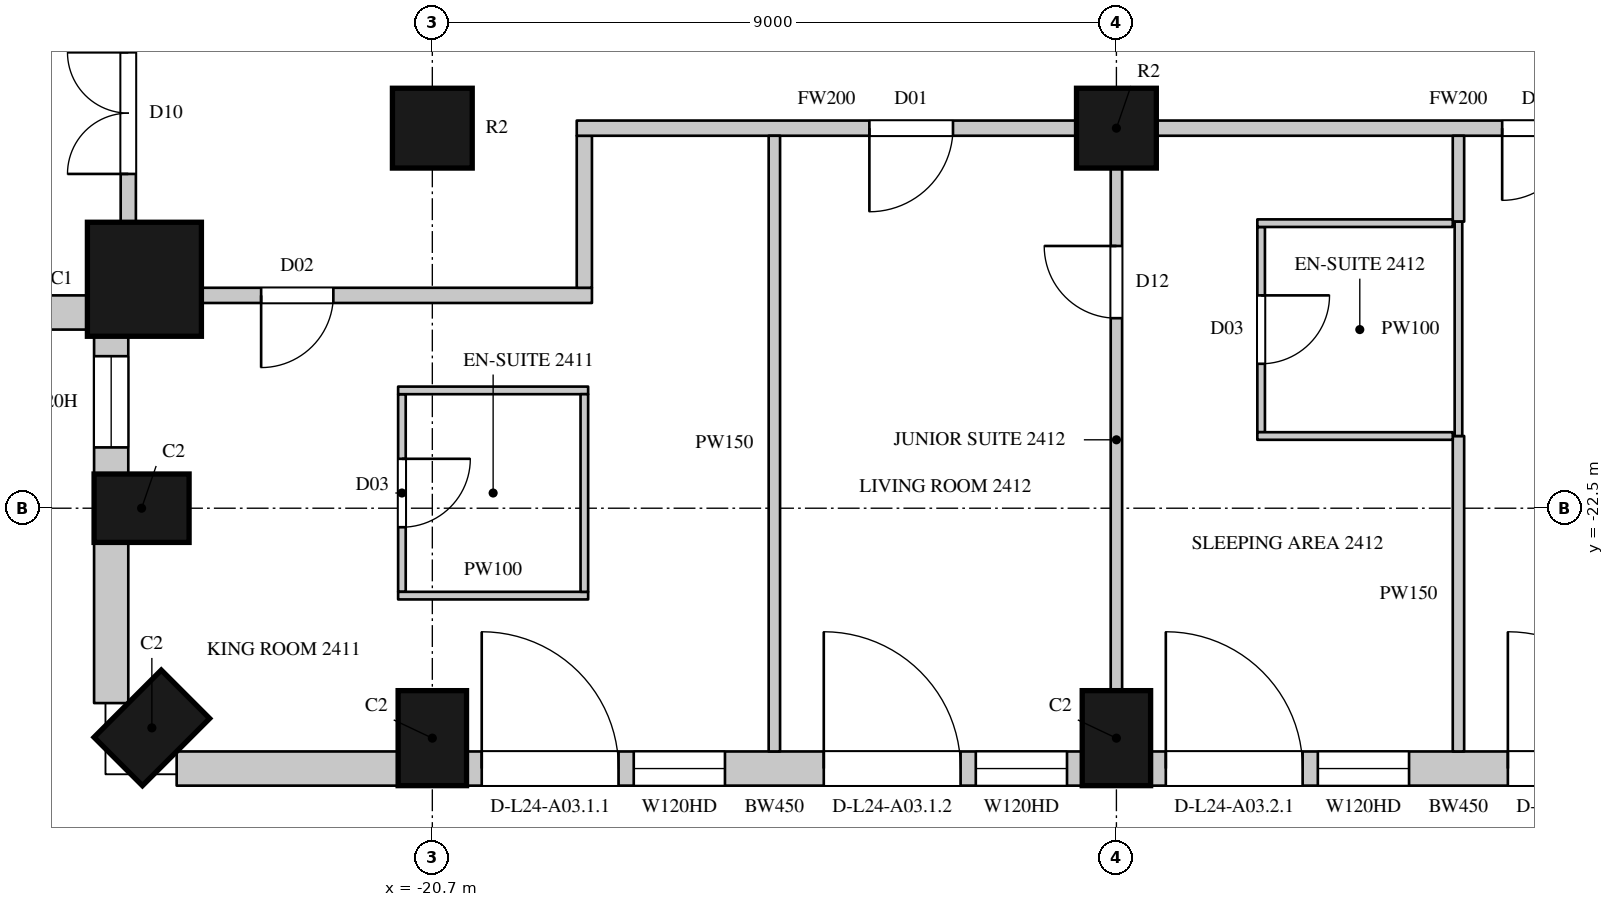
"""IFC4 building model, lengths in metres.
Left out: names, types, materials, properties, quantities, classifications, styles, units other than length and angle.
Written with IfcOpenShell. Run it as: python <this file> out.ifc"""

import sys

from ifc_helpers import new_model, si_unit, direction, frame, frame_2d, origin, origin_2d, place, context, subcontext, project, spatial, rectangle, circle, extrude, element, fill, save


model = new_model("IFC4")
c1 = context("Model", 3, precision=1e-05, world=origin(), true_north=direction((0.0, 1.0)))
c2 = subcontext(c1, "Body", "Model", "MODEL_VIEW")
j1 = project(units=[si_unit("LENGTHUNIT", "METRE"), si_unit("PLANEANGLEUNIT", "RADIAN")], contexts=[c1])
p1 = place(None, origin())
s1 = spatial("IfcSite", under=j1, at=p1, CompositionType="ELEMENT")
p2 = place(p1, origin())
s2 = spatial("IfcBuilding", under=s1, at=p2, CompositionType="ELEMENT")
p3 = place(p2, frame((0.0, 0.0, 116.7)))
s3 = spatial("IfcBuildingStorey", under=s2, at=p3, CompositionType="ELEMENT", Elevation=116.7)
p4 = place(p3, frame((-24.488, -19.488, 0.0), z_axis=(0.0, 0.0, 1.0), x_axis=(1.0, 0.0, 0.0)))
e1 = element("IfcColumn", 1, at=p4, inside=s3, PredefinedType="COLUMN", context=c2, shape_type="SweptSolid", body=[
    extrude(circle(Radius=0.75, at=origin_2d()), origin(), (0.0, 0.0, 1.0), 3.6),
])
for number, where, z_axis, x_axis in (
    (2, (-24.525, -22.5, 0.0), (0.0, 0.0, 1.0), (0.0, -1.0, 0.0)),
    (3, (-24.39, -25.39, 0.0), (0.0, 0.0, 1.0), (0.707, -0.707, 0.0)),
    (4, (-20.7, -25.525, 0.0), (0.0, 0.0, 1.0), (1.0, 0.0, 0.0)),
    (5, (-11.7, -25.525, 0.0), (0.0, 0.0, 1.0), (1.0, 0.0, 0.0)),
):
    element("IfcColumn", number, at=place(p3, frame(where, z_axis=z_axis, x_axis=x_axis)), inside=s3, PredefinedType="COLUMN", context=c2, shape_type="SweptSolid", body=[
        extrude(rectangle(XDim=0.9, YDim=1.25, at=origin_2d()), origin(), (0.0, 0.0, 1.0), 3.6),
    ])
for number, where, z_axis, x_axis in (
    (6, (-20.7, -17.5, 0.0), (0.0, 0.0, 1.0), (1.0, 0.0, 0.0)),
    (7, (-11.7, -17.5, 0.0), (0.0, 0.0, 1.0), (1.0, 0.0, 0.0)),
):
    element("IfcColumn", number, at=place(p3, frame(where, z_axis=z_axis, x_axis=x_axis)), inside=s3, PredefinedType="COLUMN", context=c2, shape_type="SweptSolid", body=[
        extrude(circle(Radius=0.525, at=origin_2d()), origin(), (0.0, 0.0, 1.0), 3.6),
    ])
p5 = place(p3, frame((-29.064, -19.925, 0.0), z_axis=(0.0, 0.0, 1.0), x_axis=(1.0, 0.0, 0.0)))
e8 = element("IfcWall", 8, at=p5, inside=s3, PredefinedType="SOLIDWALL", context=c2, shape_type="SweptSolid", body=[
    extrude(rectangle(XDim=3.857, YDim=0.45, at=frame_2d((1.928, 0.0))), origin(), (0.0, 0.0, 1.0), 3.3),
])
p6 = place(p5, frame((0.514, 0.0, 1.05)))
e9 = element("IfcOpeningElement", 9, at=p6, cuts=e8, PredefinedType="OPENING", context=c2, shape_type="SweptSolid", body=[
    extrude(rectangle(XDim=2.7, YDim=2.0, at=frame_2d((1.35, 1.0))), frame((0.0, 0.235, 0.0), z_axis=(0.0, -1.0, 0.0), x_axis=(1.0, 0.0, 0.0)), (0.0, 0.0, 1.0), 0.47),
])
p7 = place(p3, frame((-24.925, -20.207, 0.0), z_axis=(0.0, 0.0, 1.0), x_axis=(0.0, -1.0, 0.0)))
e10 = element("IfcWall", 10, at=p7, inside=s3, PredefinedType="SOLIDWALL", context=c2, shape_type="SweptSolid", body=[
    extrude(rectangle(XDim=1.843, YDim=0.45, at=frame_2d((0.921, 0.0))), origin(), (0.0, 0.0, 1.0), 3.3),
])
p8 = place(p7, frame((0.293, 0.0, 1.05)))
e11 = element("IfcOpeningElement", 11, at=p8, cuts=e10, PredefinedType="OPENING", context=c2, shape_type="SweptSolid", body=[
    extrude(rectangle(XDim=1.2, YDim=2.0, at=frame_2d((0.6, 1.0))), frame((0.0, 0.235, 0.0), z_axis=(0.0, -1.0, 0.0), x_axis=(1.0, 0.0, 0.0)), (0.0, 0.0, 1.0), 0.47),
])
p9 = place(p3, frame((-24.925, -22.95, 0.0), z_axis=(0.0, 0.0, 1.0), x_axis=(0.0, -1.0, 0.0)))
e12 = element("IfcWall", 12, at=p9, inside=s3, PredefinedType="SOLIDWALL", context=c2, shape_type="SweptSolid", body=[
    extrude(rectangle(XDim=2.114, YDim=0.45, at=frame_2d((1.057, 0.0))), origin(), (0.0, 0.0, 1.0), 3.3),
])
p10 = place(p3, frame((-24.064, -25.925, 0.0), z_axis=(0.0, 0.0, 1.0), x_axis=(1.0, 0.0, 0.0)))
e13 = element("IfcWall", 13, at=p10, inside=s3, PredefinedType="SOLIDWALL", context=c2, shape_type="SweptSolid", body=[
    extrude(rectangle(XDim=2.914, YDim=0.45, at=frame_2d((1.457, 0.0))), origin(), (0.0, 0.0, 1.0), 3.3),
])
p11 = place(p3, frame((-20.25, -25.925, 0.0), z_axis=(0.0, 0.0, 1.0), x_axis=(1.0, 0.0, 0.0)))
e14 = element("IfcWall", 14, at=p11, inside=s3, PredefinedType="SOLIDWALL", context=c2, shape_type="SweptSolid", body=[
    extrude(rectangle(XDim=8.1, YDim=0.45, at=frame_2d((4.05, 0.0))), origin(), (0.0, 0.0, 1.0), 3.3),
])
p12 = place(p11, frame((0.2, 0.0, 0.0)))
e15 = element("IfcOpeningElement", 15, at=p12, cuts=e14, PredefinedType="OPENING", context=c2, shape_type="SweptSolid", body=[
    extrude(rectangle(XDim=1.8, YDim=2.4, at=frame_2d((0.9, 1.2))), frame((0.0, 0.235, 0.0), z_axis=(0.0, -1.0, 0.0), x_axis=(1.0, 0.0, 0.0)), (0.0, 0.0, 1.0), 0.47),
])
p13 = place(p11, frame((2.2, 0.0, 1.05)))
e16 = element("IfcOpeningElement", 16, at=p13, cuts=e14, PredefinedType="OPENING", context=c2, shape_type="SweptSolid", body=[
    extrude(rectangle(XDim=1.2, YDim=2.0, at=frame_2d((0.6, 1.0))), frame((0.0, 0.235, 0.0), z_axis=(0.0, -1.0, 0.0), x_axis=(1.0, 0.0, 0.0)), (0.0, 0.0, 1.0), 0.47),
])
p14 = place(p11, frame((4.7, 0.0, 0.0)))
e17 = element("IfcOpeningElement", 17, at=p14, cuts=e14, PredefinedType="OPENING", context=c2, shape_type="SweptSolid", body=[
    extrude(rectangle(XDim=1.8, YDim=2.4, at=frame_2d((0.9, 1.2))), frame((0.0, 0.235, 0.0), z_axis=(0.0, -1.0, 0.0), x_axis=(1.0, 0.0, 0.0)), (0.0, 0.0, 1.0), 0.47),
])
p15 = place(p11, frame((6.7, 0.0, 1.05)))
e18 = element("IfcOpeningElement", 18, at=p15, cuts=e14, PredefinedType="OPENING", context=c2, shape_type="SweptSolid", body=[
    extrude(rectangle(XDim=1.2, YDim=2.0, at=frame_2d((0.6, 1.0))), frame((0.0, 0.235, 0.0), z_axis=(0.0, -1.0, 0.0), x_axis=(1.0, 0.0, 0.0)), (0.0, 0.0, 1.0), 0.47),
])
p16 = place(p3, frame((-11.25, -25.925, 0.0), z_axis=(0.0, 0.0, 1.0), x_axis=(1.0, 0.0, 0.0)))
e19 = element("IfcWall", 19, at=p16, inside=s3, PredefinedType="SOLIDWALL", context=c2, shape_type="SweptSolid", body=[
    extrude(rectangle(XDim=8.1, YDim=0.45, at=frame_2d((4.05, 0.0))), origin(), (0.0, 0.0, 1.0), 3.3),
])
p17 = place(p16, frame((0.2, 0.0, 0.0)))
e20 = element("IfcOpeningElement", 20, at=p17, cuts=e19, PredefinedType="OPENING", context=c2, shape_type="SweptSolid", body=[
    extrude(rectangle(XDim=1.8, YDim=2.4, at=frame_2d((0.9, 1.2))), frame((0.0, 0.235, 0.0), z_axis=(0.0, -1.0, 0.0), x_axis=(1.0, 0.0, 0.0)), (0.0, 0.0, 1.0), 0.47),
])
p18 = place(p16, frame((2.2, 0.0, 1.05)))
e21 = element("IfcOpeningElement", 21, at=p18, cuts=e19, PredefinedType="OPENING", context=c2, shape_type="SweptSolid", body=[
    extrude(rectangle(XDim=1.2, YDim=2.0, at=frame_2d((0.6, 1.0))), frame((0.0, 0.235, 0.0), z_axis=(0.0, -1.0, 0.0), x_axis=(1.0, 0.0, 0.0)), (0.0, 0.0, 1.0), 0.47),
])
p19 = place(p16, frame((4.7, 0.0, 0.0)))
e22 = element("IfcOpeningElement", 22, at=p19, cuts=e19, PredefinedType="OPENING", context=c2, shape_type="SweptSolid", body=[
    extrude(rectangle(XDim=1.8, YDim=2.4, at=frame_2d((0.9, 1.2))), frame((0.0, 0.235, 0.0), z_axis=(0.0, -1.0, 0.0), x_axis=(1.0, 0.0, 0.0)), (0.0, 0.0, 1.0), 0.47),
])
p20 = place(p16, frame((6.7, 0.0, 1.05)))
e23 = element("IfcOpeningElement", 23, at=p20, cuts=e19, PredefinedType="OPENING", context=c2, shape_type="SweptSolid", body=[
    extrude(rectangle(XDim=1.2, YDim=2.0, at=frame_2d((0.6, 1.0))), frame((0.0, 0.235, 0.0), z_axis=(0.0, -1.0, 0.0), x_axis=(1.0, 0.0, 0.0)), (0.0, 0.0, 1.0), 0.47),
])
p21 = place(p3, frame((-24.7, -18.752, 0.0), z_axis=(0.0, 0.0, 1.0), x_axis=(0.0, 1.0, 0.0)))
e24 = element("IfcWall", 24, at=p21, inside=s3, PredefinedType="PARTITIONING", context=c2, shape_type="SweptSolid", body=[
    extrude(rectangle(XDim=2.722, YDim=0.2, at=frame_2d((1.361, 0.0))), origin(), (0.0, 0.0, 1.0), 3.3),
])
p22 = place(p21, frame((0.65, 0.0, 0.0)))
e25 = element("IfcOpeningElement", 25, at=p22, cuts=e24, PredefinedType="OPENING", context=c2, shape_type="SweptSolid", body=[
    extrude(rectangle(XDim=1.6, YDim=2.4, at=frame_2d((0.8, 1.2))), frame((0.0, 0.11, 0.0), z_axis=(0.0, -1.0, 0.0), x_axis=(1.0, 0.0, 0.0)), (0.0, 0.0, 1.0), 0.22),
])
p23 = place(p3, frame((-23.752, -19.7, 0.0), z_axis=(0.0, 0.0, 1.0), x_axis=(1.0, 0.0, 0.0)))
e26 = element("IfcWall", 26, at=p23, inside=s3, PredefinedType="PARTITIONING", context=c2, shape_type="SweptSolid", body=[
    extrude(rectangle(XDim=5.152, YDim=0.2, at=frame_2d((2.576, 0.0))), origin(), (0.0, 0.0, 1.0), 3.3),
])
p24 = place(p23, frame((0.8, 0.0, 0.0)))
e27 = element("IfcOpeningElement", 27, at=p24, cuts=e26, PredefinedType="OPENING", context=c2, shape_type="SweptSolid", body=[
    extrude(rectangle(XDim=0.95, YDim=2.2, at=frame_2d((0.475, 1.1))), frame((0.0, 0.11, 0.0), z_axis=(0.0, -1.0, 0.0), x_axis=(1.0, 0.0, 0.0)), (0.0, 0.0, 1.0), 0.22),
])
p25 = place(p3, frame((-18.7, -19.6, 0.0), z_axis=(0.0, 0.0, 1.0), x_axis=(0.0, 1.0, 0.0)))
e28 = element("IfcWall", 28, at=p25, inside=s3, PredefinedType="PARTITIONING", context=c2, shape_type="SweptSolid", body=[
    extrude(rectangle(XDim=2.0, YDim=0.2, at=frame_2d((1.0, 0.0))), origin(), (0.0, 0.0, 1.0), 3.3),
])
p26 = place(p3, frame((-18.8, -17.5, 0.0), z_axis=(0.0, 0.0, 1.0), x_axis=(1.0, 0.0, 0.0)))
e29 = element("IfcWall", 29, at=p26, inside=s3, PredefinedType="PARTITIONING", context=c2, shape_type="SweptSolid", body=[
    extrude(rectangle(XDim=6.575, YDim=0.2, at=frame_2d((3.288, 0.0))), origin(), (0.0, 0.0, 1.0), 2.75),
])
p27 = place(p26, frame((3.85, 0.0, 0.0)))
e30 = element("IfcOpeningElement", 30, at=p27, cuts=e29, PredefinedType="OPENING", context=c2, shape_type="SweptSolid", body=[
    extrude(rectangle(XDim=1.1, YDim=2.4, at=frame_2d((0.55, 1.2))), frame((0.0, 0.11, 0.0), z_axis=(0.0, -1.0, 0.0), x_axis=(1.0, 0.0, 0.0)), (0.0, 0.0, 1.0), 0.22),
])
p28 = place(p3, frame((-11.175, -17.5, 0.0), z_axis=(0.0, 0.0, 1.0), x_axis=(1.0, 0.0, 0.0)))
e31 = element("IfcWall", 31, at=p28, inside=s3, PredefinedType="PARTITIONING", context=c2, shape_type="SweptSolid", body=[
    extrude(rectangle(XDim=7.95, YDim=0.2, at=frame_2d((3.975, 0.0))), origin(), (0.0, 0.0, 1.0), 2.75),
])
p29 = place(p28, frame((4.55, 0.0, 0.0)))
e32 = element("IfcOpeningElement", 32, at=p29, cuts=e31, PredefinedType="OPENING", context=c2, shape_type="SweptSolid", body=[
    extrude(rectangle(XDim=0.95, YDim=2.2, at=frame_2d((0.475, 1.1))), frame((0.0, 0.11, 0.0), z_axis=(0.0, -1.0, 0.0), x_axis=(1.0, 0.0, 0.0)), (0.0, 0.0, 1.0), 0.22),
])
p30 = place(p3, frame((-16.2, -25.7, 0.0), z_axis=(0.0, 0.0, 1.0), x_axis=(0.0, 1.0, 0.0)))
e33 = element("IfcWall", 33, at=p30, inside=s3, PredefinedType="PARTITIONING", context=c2, shape_type="SweptSolid", body=[
    extrude(rectangle(XDim=8.1, YDim=0.15, at=frame_2d((4.05, 0.0))), origin(), (0.0, 0.0, 1.0), 2.65),
])
p31 = place(p3, frame((-11.7, -24.9, 0.0), z_axis=(0.0, 0.0, 1.0), x_axis=(0.0, 1.0, 0.0)))
e34 = element("IfcWall", 34, at=p31, inside=s3, PredefinedType="PARTITIONING", context=c2, shape_type="SweptSolid", body=[
    extrude(rectangle(XDim=6.875, YDim=0.15, at=frame_2d((3.438, 0.0))), origin(), (0.0, 0.0, 1.0), 2.75),
])
p32 = place(p31, frame((4.9, 0.0, 0.0)))
e35 = element("IfcOpeningElement", 35, at=p32, cuts=e34, PredefinedType="OPENING", context=c2, shape_type="SweptSolid", body=[
    extrude(rectangle(XDim=0.95, YDim=2.2, at=frame_2d((0.475, 1.1))), frame((0.0, 0.085, 0.0), z_axis=(0.0, -1.0, 0.0), x_axis=(1.0, 0.0, 0.0)), (0.0, 0.0, 1.0), 0.17),
])
p33 = place(p3, frame((-7.2, -25.7, 0.0), z_axis=(0.0, 0.0, 1.0), x_axis=(0.0, 1.0, 0.0)))
e36 = element("IfcWall", 36, at=p33, inside=s3, PredefinedType="PARTITIONING", context=c2, shape_type="SweptSolid", body=[
    extrude(rectangle(XDim=4.15, YDim=0.15, at=frame_2d((2.075, 0.0))), origin(), (0.0, 0.0, 1.0), 2.65),
])
p34 = place(p3, frame((-7.2, -18.73, 0.0), z_axis=(0.0, 0.0, 1.0), x_axis=(0.0, 1.0, 0.0)))
e37 = element("IfcWall", 37, at=p34, inside=s3, PredefinedType="PARTITIONING", context=c2, shape_type="SweptSolid", body=[
    extrude(rectangle(XDim=1.13, YDim=0.15, at=frame_2d((0.565, 0.0))), origin(), (0.0, 0.0, 1.0), 2.65),
])
p35 = place(p3, frame((-21.1, -23.6, 0.0), z_axis=(0.0, 0.0, 1.0), x_axis=(0.0, 1.0, 0.0)))
e38 = element("IfcWall", 38, at=p35, inside=s3, PredefinedType="PARTITIONING", context=c2, shape_type="SweptSolid", body=[
    extrude(rectangle(XDim=2.6, YDim=0.1, at=frame_2d((1.3, 0.0))), origin(), (0.0, 0.0, 1.0), 3.3),
])
p36 = place(p35, frame((0.85, 0.0, 0.0)))
e39 = element("IfcOpeningElement", 39, at=p36, cuts=e38, PredefinedType="OPENING", context=c2, shape_type="SweptSolid", body=[
    extrude(rectangle(XDim=0.9, YDim=2.2, at=frame_2d((0.45, 1.1))), frame((0.0, 0.06, 0.0), z_axis=(0.0, -1.0, 0.0), x_axis=(1.0, 0.0, 0.0)), (0.0, 0.0, 1.0), 0.12),
])
for number, where, z_axis, x_axis in (
    (40, (-21.15, -23.65, 0.0), (0.0, 0.0, 1.0), (1.0, 0.0, 0.0)),
    (41, (-21.15, -20.95, 0.0), (0.0, 0.0, 1.0), (1.0, 0.0, 0.0)),
):
    element("IfcWall", number, at=place(p3, frame(where, z_axis=z_axis, x_axis=x_axis)), inside=s3, PredefinedType="PARTITIONING", context=c2, shape_type="SweptSolid", body=[
        extrude(rectangle(XDim=2.5, YDim=0.1, at=frame_2d((1.25, 0.0))), origin(), (0.0, 0.0, 1.0), 3.3),
    ])
p37 = place(p3, frame((-18.7, -23.6, 0.0), z_axis=(0.0, 0.0, 1.0), x_axis=(0.0, 1.0, 0.0)))
e42 = element("IfcWall", 42, at=p37, inside=s3, PredefinedType="PARTITIONING", context=c2, shape_type="SweptSolid", body=[
    extrude(rectangle(XDim=2.6, YDim=0.1, at=frame_2d((1.3, 0.0))), origin(), (0.0, 0.0, 1.0), 3.3),
])
p38 = place(p3, frame((-9.796, -21.5, 0.0), z_axis=(0.0, 0.0, 1.0), x_axis=(0.0, 1.0, 0.0)))
e43 = element("IfcWall", 43, at=p38, inside=s3, PredefinedType="PARTITIONING", context=c2, shape_type="SweptSolid", body=[
    extrude(rectangle(XDim=2.7, YDim=0.1, at=frame_2d((1.35, 0.0))), origin(), (0.0, 0.0, 1.0), 3.3),
])
p39 = place(p38, frame((0.9, 0.0, 0.0)))
e44 = element("IfcOpeningElement", 44, at=p39, cuts=e43, PredefinedType="OPENING", context=c2, shape_type="SweptSolid", body=[
    extrude(rectangle(XDim=0.9, YDim=2.2, at=frame_2d((0.45, 1.1))), frame((0.0, 0.06, 0.0), z_axis=(0.0, -1.0, 0.0), x_axis=(1.0, 0.0, 0.0)), (0.0, 0.0, 1.0), 0.12),
])
for number, where, z_axis, x_axis in (
    (45, (-9.846, -21.55, 0.0), (0.0, 0.0, 1.0), (1.0, 0.0, 0.0)),
    (46, (-9.846, -18.75, 0.0), (0.0, 0.0, 1.0), (1.0, 0.0, 0.0)),
):
    element("IfcWall", number, at=place(p3, frame(where, z_axis=z_axis, x_axis=x_axis)), inside=s3, PredefinedType="PARTITIONING", context=c2, shape_type="SweptSolid", body=[
        extrude(rectangle(XDim=2.571, YDim=0.1, at=frame_2d((1.286, 0.0))), origin(), (0.0, 0.0, 1.0), 3.3),
    ])
p40 = place(p3, frame((-7.2, -21.55, 0.0), z_axis=(0.0, 0.0, 1.0), x_axis=(0.0, 1.0, 0.0)))
e47 = element("IfcWall", 47, at=p40, inside=s3, PredefinedType="PARTITIONING", context=c2, shape_type="SweptSolid", body=[
    extrude(rectangle(XDim=2.82, YDim=0.1, at=frame_2d((1.41, 0.0))), origin(), (0.0, 0.0, 1.0), 2.65),
])
p41 = place(p8, origin())
e48 = element("IfcWindow", 48, at=p41, inside=s3, PartitioningType="SINGLE_PANEL", PredefinedType="WINDOW", context=c2, shape_type="SweptSolid", body=[
    extrude(rectangle(XDim=1.2, YDim=2.0, at=frame_2d((0.6, 1.0))), frame((0.0, 0.135, 0.0), z_axis=(0.0, -1.0, 0.0), x_axis=(1.0, 0.0, 0.0)), (0.0, 0.0, 1.0), 0.06),
])
fill(e11, e48)
p42 = place(p12, origin())
e49 = element("IfcDoor", 49, at=p42, inside=s3, OperationType="SLIDING_TO_LEFT", PredefinedType="DOOR", context=c2, shape_type="SweptSolid", body=[
    extrude(rectangle(XDim=1.8, YDim=2.4, at=frame_2d((0.9, 1.2))), frame((0.0, 0.13, 0.0), z_axis=(0.0, -1.0, 0.0), x_axis=(1.0, 0.0, 0.0)), (0.0, 0.0, 1.0), 0.05),
])
fill(e15, e49)
p43 = place(p13, origin())
e50 = element("IfcWindow", 50, at=p43, inside=s3, PartitioningType="SINGLE_PANEL", PredefinedType="WINDOW", context=c2, shape_type="SweptSolid", body=[
    extrude(rectangle(XDim=1.2, YDim=2.0, at=frame_2d((0.6, 1.0))), frame((0.0, 0.135, 0.0), z_axis=(0.0, -1.0, 0.0), x_axis=(1.0, 0.0, 0.0)), (0.0, 0.0, 1.0), 0.06),
])
fill(e16, e50)
p44 = place(p14, origin())
e51 = element("IfcDoor", 51, at=p44, inside=s3, OperationType="SLIDING_TO_LEFT", PredefinedType="DOOR", context=c2, shape_type="SweptSolid", body=[
    extrude(rectangle(XDim=1.8, YDim=2.4, at=frame_2d((0.9, 1.2))), frame((0.0, 0.13, 0.0), z_axis=(0.0, -1.0, 0.0), x_axis=(1.0, 0.0, 0.0)), (0.0, 0.0, 1.0), 0.05),
])
fill(e17, e51)
p45 = place(p15, origin())
e52 = element("IfcWindow", 52, at=p45, inside=s3, PartitioningType="SINGLE_PANEL", PredefinedType="WINDOW", context=c2, shape_type="SweptSolid", body=[
    extrude(rectangle(XDim=1.2, YDim=2.0, at=frame_2d((0.6, 1.0))), frame((0.0, 0.135, 0.0), z_axis=(0.0, -1.0, 0.0), x_axis=(1.0, 0.0, 0.0)), (0.0, 0.0, 1.0), 0.06),
])
fill(e18, e52)
p46 = place(p17, origin())
e53 = element("IfcDoor", 53, at=p46, inside=s3, OperationType="SLIDING_TO_LEFT", PredefinedType="DOOR", context=c2, shape_type="SweptSolid", body=[
    extrude(rectangle(XDim=1.8, YDim=2.4, at=frame_2d((0.9, 1.2))), frame((0.0, 0.13, 0.0), z_axis=(0.0, -1.0, 0.0), x_axis=(1.0, 0.0, 0.0)), (0.0, 0.0, 1.0), 0.05),
])
fill(e20, e53)
p47 = place(p18, origin())
e54 = element("IfcWindow", 54, at=p47, inside=s3, PartitioningType="SINGLE_PANEL", PredefinedType="WINDOW", context=c2, shape_type="SweptSolid", body=[
    extrude(rectangle(XDim=1.2, YDim=2.0, at=frame_2d((0.6, 1.0))), frame((0.0, 0.135, 0.0), z_axis=(0.0, -1.0, 0.0), x_axis=(1.0, 0.0, 0.0)), (0.0, 0.0, 1.0), 0.06),
])
fill(e21, e54)
p48 = place(p19, origin())
e55 = element("IfcDoor", 55, at=p48, inside=s3, OperationType="SLIDING_TO_LEFT", PredefinedType="DOOR", context=c2, shape_type="SweptSolid", body=[
    extrude(rectangle(XDim=1.8, YDim=2.4, at=frame_2d((0.9, 1.2))), frame((0.0, 0.13, 0.0), z_axis=(0.0, -1.0, 0.0), x_axis=(1.0, 0.0, 0.0)), (0.0, 0.0, 1.0), 0.05),
])
fill(e22, e55)
p49 = place(p22, origin())
e56 = element("IfcDoor", 56, at=p49, inside=s3, OperationType="DOUBLE_DOOR_SINGLE_SWING", PredefinedType="DOOR", context=c2, shape_type="SweptSolid", body=[
    extrude(rectangle(XDim=1.6, YDim=2.4, at=frame_2d((0.8, 1.2))), frame((0.0, 0.025, 0.0), z_axis=(0.0, -1.0, 0.0), x_axis=(1.0, 0.0, 0.0)), (0.0, 0.0, 1.0), 0.05),
])
fill(e25, e56)
p50 = place(p24, origin())
e57 = element("IfcDoor", 57, at=p50, inside=s3, OperationType="SINGLE_SWING_RIGHT", PredefinedType="DOOR", context=c2, shape_type="SweptSolid", body=[
    extrude(rectangle(XDim=0.95, YDim=2.2, at=frame_2d((0.475, 1.1))), frame((0.0, 0.025, 0.0), z_axis=(0.0, -1.0, 0.0), x_axis=(1.0, 0.0, 0.0)), (0.0, 0.0, 1.0), 0.05),
])
fill(e27, e57)
p51 = place(p36, origin())
e58 = element("IfcDoor", 58, at=p51, inside=s3, OperationType="SINGLE_SWING_LEFT", PredefinedType="DOOR", context=c2, shape_type="SweptSolid", body=[
    extrude(rectangle(XDim=0.9, YDim=2.2, at=frame_2d((0.45, 1.1))), frame((0.0, 0.025, 0.0), z_axis=(0.0, -1.0, 0.0), x_axis=(1.0, 0.0, 0.0)), (0.0, 0.0, 1.0), 0.05),
])
fill(e39, e58)
p52 = place(p27, origin())
e59 = element("IfcDoor", 59, at=p52, inside=s3, OperationType="SINGLE_SWING_RIGHT", PredefinedType="DOOR", context=c2, shape_type="SweptSolid", body=[
    extrude(rectangle(XDim=1.1, YDim=2.4, at=frame_2d((0.55, 1.2))), frame((0.0, 0.025, 0.0), z_axis=(0.0, -1.0, 0.0), x_axis=(1.0, 0.0, 0.0)), (0.0, 0.0, 1.0), 0.05),
])
fill(e30, e59)
p53 = place(p32, origin())
e60 = element("IfcDoor", 60, at=p53, inside=s3, OperationType="SINGLE_SWING_RIGHT", PredefinedType="DOOR", context=c2, shape_type="SweptSolid", body=[
    extrude(rectangle(XDim=0.95, YDim=2.2, at=frame_2d((0.475, 1.1))), frame((0.0, 0.025, 0.0), z_axis=(0.0, -1.0, 0.0), x_axis=(1.0, 0.0, 0.0)), (0.0, 0.0, 1.0), 0.05),
])
fill(e35, e60)
p54 = place(p39, origin())
e61 = element("IfcDoor", 61, at=p54, inside=s3, OperationType="SINGLE_SWING_LEFT", PredefinedType="DOOR", context=c2, shape_type="SweptSolid", body=[
    extrude(rectangle(XDim=0.9, YDim=2.2, at=frame_2d((0.45, 1.1))), frame((0.0, 0.025, 0.0), z_axis=(0.0, -1.0, 0.0), x_axis=(1.0, 0.0, 0.0)), (0.0, 0.0, 1.0), 0.05),
])
fill(e44, e61)
p55 = place(p29, origin())
e62 = element("IfcDoor", 62, at=p55, inside=s3, OperationType="SINGLE_SWING_RIGHT", PredefinedType="DOOR", context=c2, shape_type="SweptSolid", body=[
    extrude(rectangle(XDim=0.95, YDim=2.2, at=frame_2d((0.475, 1.1))), frame((0.0, 0.025, 0.0), z_axis=(0.0, -1.0, 0.0), x_axis=(1.0, 0.0, 0.0)), (0.0, 0.0, 1.0), 0.05),
])
fill(e32, e62)
save(model, sys.argv[1])
